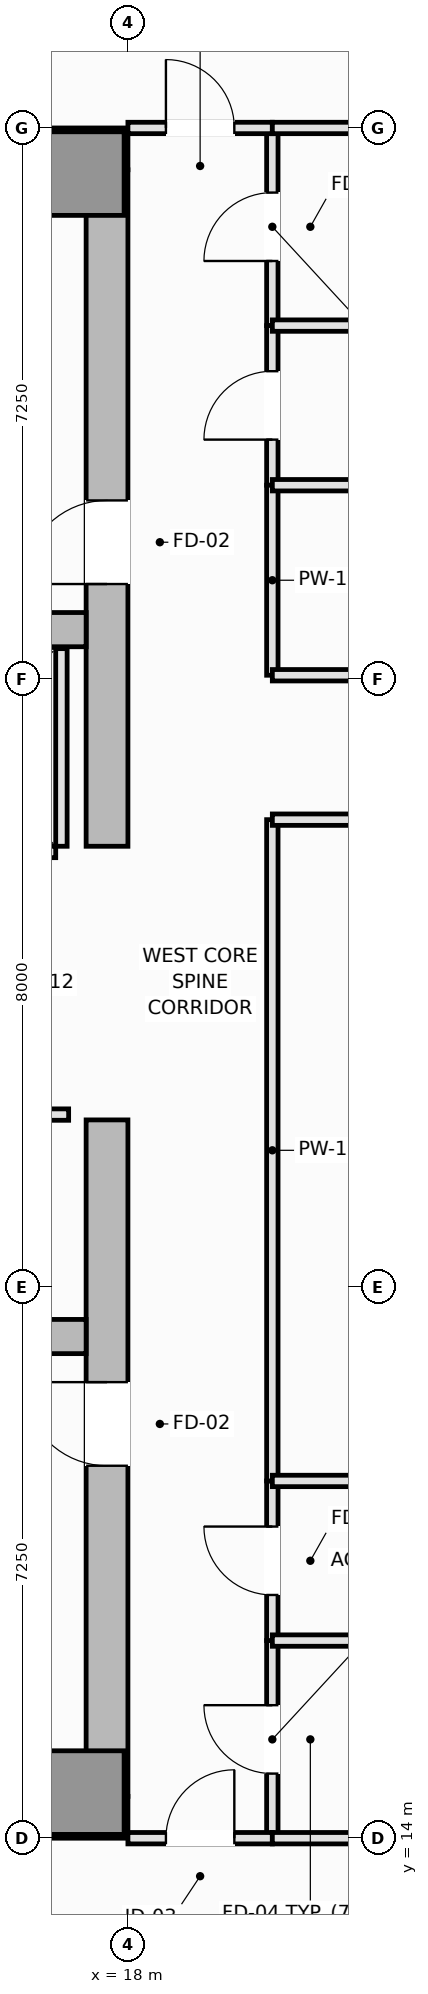
"""IFC4 building model, lengths in metres.
Left out: names, types, materials, properties, quantities, classifications, styles, units other than length and angle.
Written with IfcOpenShell. Run it as: python <this file> out.ifc"""

import sys

from ifc_helpers import new_model, si_unit, direction, frame, frame_2d, origin, origin_2d, place, context, subcontext, project, spatial, rectangle, extrude, element, fill, save


model = new_model("IFC4")
c1 = context("Model", 3, precision=1e-05, world=origin(), true_north=direction((0.0, 1.0)))
c2 = subcontext(c1, "Body", "Model", "MODEL_VIEW")
j1 = project(units=[si_unit("LENGTHUNIT", "METRE"), si_unit("PLANEANGLEUNIT", "RADIAN")], contexts=[c1])
p1 = place(None, origin())
s1 = spatial("IfcSite", under=j1, at=p1, CompositionType="ELEMENT")
p2 = place(p1, origin())
s2 = spatial("IfcBuilding", under=s1, at=p2, CompositionType="ELEMENT")
p3 = place(p2, frame((0.0, 0.0, 209.35)))
s3 = spatial("IfcBuildingStorey", under=s2, at=p3, CompositionType="ELEMENT", Elevation=209.35)
for number, where, z_axis, x_axis in (
    (1, (4.5, 14.275, 0.0), (0.0, 0.0, 1.0), (1.0, 0.0, 0.0)),
    (2, (4.5, 36.225, 0.0), (0.0, 0.0, 1.0), (1.0, 0.0, 0.0)),
):
    element("IfcWall", number, at=place(p3, frame(where, z_axis=z_axis, x_axis=x_axis)), inside=s3, PredefinedType="SHEAR", context=c2, shape_type="SweptSolid", body=[
        extrude(rectangle(XDim=13.5, YDim=0.55, at=frame_2d((6.75, 0.0))), origin(), (0.0, 0.0, 1.0), 3.55),
    ])
p4 = place(p3, frame((17.725, 14.55, 0.0), z_axis=(0.0, 0.0, 1.0), x_axis=(0.0, 1.0, 0.0)))
e3 = element("IfcWall", 3, at=p4, inside=s3, PredefinedType="SHEAR", context=c2, shape_type="SweptSolid", body=[
    extrude(rectangle(XDim=8.9, YDim=0.55, at=frame_2d((4.45, 0.0))), origin(), (0.0, 0.0, 1.0), 3.55),
])
p5 = place(p4, frame((4.35, 0.0, 0.0)))
e4 = element("IfcOpeningElement", 4, at=p5, cuts=e3, PredefinedType="OPENING", context=c2, shape_type="SweptSolid", body=[
    extrude(rectangle(XDim=1.1, YDim=2.15, at=frame_2d((0.55, 1.075))), frame((0.0, 0.285, 0.0), z_axis=(0.0, -1.0, 0.0), x_axis=(1.0, 0.0, 0.0)), (0.0, 0.0, 1.0), 0.57),
])
p6 = place(p3, frame((17.725, 27.05, 0.0), z_axis=(0.0, 0.0, 1.0), x_axis=(0.0, 1.0, 0.0)))
e5 = element("IfcWall", 5, at=p6, inside=s3, PredefinedType="SHEAR", context=c2, shape_type="SweptSolid", body=[
    extrude(rectangle(XDim=8.9, YDim=0.55, at=frame_2d((4.45, 0.0))), origin(), (0.0, 0.0, 1.0), 3.55),
])
p7 = place(p6, frame((3.45, 0.0, 0.0)))
e6 = element("IfcOpeningElement", 6, at=p7, cuts=e5, PredefinedType="OPENING", context=c2, shape_type="SweptSolid", body=[
    extrude(rectangle(XDim=1.1, YDim=2.15, at=frame_2d((0.55, 1.075))), frame((0.0, 0.285, 0.0), z_axis=(0.0, -1.0, 0.0), x_axis=(1.0, 0.0, 0.0)), (0.0, 0.0, 1.0), 0.57),
])
for number, where, z_axis, x_axis in (
    (7, (5.05, 20.6, 0.0), (0.0, 0.0, 1.0), (1.0, 0.0, 0.0)),
    (8, (5.05, 29.9, 0.0), (0.0, 0.0, 1.0), (1.0, 0.0, 0.0)),
):
    element("IfcWall", number, at=place(p3, frame(where, z_axis=z_axis, x_axis=x_axis)), inside=s3, PredefinedType="SHEAR", context=c2, shape_type="SweptSolid", body=[
        extrude(rectangle(XDim=12.4, YDim=0.45, at=frame_2d((6.2, 0.0))), origin(), (0.0, 0.0, 1.0), 3.55),
    ])
for number, where, z_axis, x_axis in (
    (9, (17.4, 14.6, 0.0), (0.0, 0.0, 1.0), (1.0, 0.0, 0.0)),
    (10, (17.4, 35.9, 0.0), (0.0, 0.0, 1.0), (1.0, 0.0, 0.0)),
):
    element("IfcColumn", number, at=place(p3, frame(where, z_axis=z_axis, x_axis=x_axis)), inside=s3, PredefinedType="PILASTER", context=c2, shape_type="SweptSolid", body=[
        extrude(rectangle(XDim=1.1, YDim=1.1, at=origin_2d()), origin(), (0.0, 0.0, 1.0), 3.55),
    ])
p8 = place(p3, frame((14.5, 26.975, 0.0), z_axis=(0.0, 0.0, 1.0), x_axis=(1.0, 0.0, 0.0)))
e11 = element("IfcWall", 11, at=p8, inside=s3, PredefinedType="PARTITIONING", context=c2, shape_type="SweptSolid", body=[
    extrude(rectangle(XDim=2.55, YDim=0.15, at=frame_2d((1.275, 0.0))), origin(), (0.0, 0.0, 1.0), 3.37),
])
p9 = place(p8, frame((0.625, 0.0, 0.0)))
e12 = element("IfcOpeningElement", 12, at=p9, cuts=e11, PredefinedType="OPENING", context=c2, shape_type="SweptSolid", body=[
    extrude(rectangle(XDim=1.3, YDim=2.2, at=frame_2d((0.65, 1.1))), frame((0.0, 0.085, 0.0), z_axis=(0.0, -1.0, 0.0), x_axis=(1.0, 0.0, 0.0)), (0.0, 0.0, 1.0), 0.17),
])
p10 = place(p3, frame((17.125, 27.05, 0.0), z_axis=(0.0, 0.0, 1.0), x_axis=(0.0, 1.0, 0.0)))
e13 = element("IfcWall", 13, at=p10, inside=s3, PredefinedType="PARTITIONING", context=c2, shape_type="SweptSolid", body=[
    extrude(rectangle(XDim=2.6, YDim=0.15, at=frame_2d((1.3, 0.0))), origin(), (0.0, 0.0, 1.0), 3.37),
])
p11 = place(p3, frame((16.05, 23.52, 0.0), z_axis=(0.0, 0.0, 1.0), x_axis=(1.0, 0.0, 0.0)))
e14 = element("IfcWall", 14, at=p11, inside=s3, PredefinedType="PARTITIONING", context=c2, shape_type="SweptSolid", body=[
    extrude(rectangle(XDim=1.17, YDim=0.15, at=frame_2d((0.585, 0.0))), origin(), (0.0, 0.0, 1.0), 3.37),
])
p12 = place(p3, frame((19.9, 14.0, 0.0), z_axis=(0.0, 0.0, 1.0), x_axis=(0.0, 1.0, 0.0)))
e15 = element("IfcWall", 15, at=p12, inside=s3, PredefinedType="PLUMBINGWALL", context=c2, shape_type="SweptSolid", body=[
    extrude(rectangle(XDim=2.6, YDim=0.15, at=frame_2d((1.3, 0.0))), origin(), (0.0, 0.0, 1.0), 3.37),
])
p13 = place(p12, frame((0.85, 0.0, 0.0)))
e16 = element("IfcOpeningElement", 16, at=p13, cuts=e15, PredefinedType="OPENING", context=c2, shape_type="SweptSolid", body=[
    extrude(rectangle(XDim=0.9, YDim=2.1, at=frame_2d((0.45, 1.05))), frame((0.0, 0.085, 0.0), z_axis=(0.0, -1.0, 0.0), x_axis=(1.0, 0.0, 0.0)), (0.0, 0.0, 1.0), 0.17),
])
p14 = place(p3, frame((19.9, 33.9, 0.0), z_axis=(0.0, 0.0, 1.0), x_axis=(0.0, 1.0, 0.0)))
e17 = element("IfcWall", 17, at=p14, inside=s3, PredefinedType="PLUMBINGWALL", context=c2, shape_type="SweptSolid", body=[
    extrude(rectangle(XDim=2.6, YDim=0.15, at=frame_2d((1.3, 0.0))), origin(), (0.0, 0.0, 1.0), 3.37),
])
p15 = place(p14, frame((0.85, 0.0, 0.0)))
e18 = element("IfcOpeningElement", 18, at=p15, cuts=e17, PredefinedType="OPENING", context=c2, shape_type="SweptSolid", body=[
    extrude(rectangle(XDim=0.9, YDim=2.1, at=frame_2d((0.45, 1.05))), frame((0.0, 0.085, 0.0), z_axis=(0.0, -1.0, 0.0), x_axis=(1.0, 0.0, 0.0)), (0.0, 0.0, 1.0), 0.17),
])
p16 = place(p3, frame((19.9, 16.6, 0.0), z_axis=(0.0, 0.0, 1.0), x_axis=(0.0, 1.0, 0.0)))
e19 = element("IfcWall", 19, at=p16, inside=s3, PredefinedType="PLUMBINGWALL", context=c2, shape_type="SweptSolid", body=[
    extrude(rectangle(XDim=2.1, YDim=0.15, at=frame_2d((1.05, 0.0))), origin(), (0.0, 0.0, 1.0), 3.37),
])
p17 = place(p16, frame((0.6, 0.0, 0.0)))
e20 = element("IfcOpeningElement", 20, at=p17, cuts=e19, PredefinedType="OPENING", context=c2, shape_type="SweptSolid", body=[
    extrude(rectangle(XDim=0.9, YDim=2.1, at=frame_2d((0.45, 1.05))), frame((0.0, 0.085, 0.0), z_axis=(0.0, -1.0, 0.0), x_axis=(1.0, 0.0, 0.0)), (0.0, 0.0, 1.0), 0.17),
])
p18 = place(p3, frame((19.9, 31.8, 0.0), z_axis=(0.0, 0.0, 1.0), x_axis=(0.0, 1.0, 0.0)))
e21 = element("IfcWall", 21, at=p18, inside=s3, PredefinedType="PLUMBINGWALL", context=c2, shape_type="SweptSolid", body=[
    extrude(rectangle(XDim=2.1, YDim=0.15, at=frame_2d((1.05, 0.0))), origin(), (0.0, 0.0, 1.0), 3.37),
])
p19 = place(p18, frame((0.6, 0.0, 0.0)))
e22 = element("IfcOpeningElement", 22, at=p19, cuts=e21, PredefinedType="OPENING", context=c2, shape_type="SweptSolid", body=[
    extrude(rectangle(XDim=0.9, YDim=2.1, at=frame_2d((0.45, 1.05))), frame((0.0, 0.085, 0.0), z_axis=(0.0, -1.0, 0.0), x_axis=(1.0, 0.0, 0.0)), (0.0, 0.0, 1.0), 0.17),
])
p20 = place(p3, frame((19.9, 18.7, 0.0), z_axis=(0.0, 0.0, 1.0), x_axis=(0.0, 1.0, 0.0)))
e23 = element("IfcWall", 23, at=p20, inside=s3, PredefinedType="PARTITIONING", context=c2, shape_type="SweptSolid", body=[
    extrude(rectangle(XDim=8.7, YDim=0.15, at=frame_2d((4.35, 0.0))), origin(), (0.0, 0.0, 1.0), 3.37),
])
p21 = place(p3, frame((19.9, 29.3, 0.0), z_axis=(0.0, 0.0, 1.0), x_axis=(0.0, 1.0, 0.0)))
e24 = element("IfcWall", 24, at=p21, inside=s3, PredefinedType="PARTITIONING", context=c2, shape_type="SweptSolid", body=[
    extrude(rectangle(XDim=2.5, YDim=0.15, at=frame_2d((1.25, 0.0))), origin(), (0.0, 0.0, 1.0), 3.37),
])
p22 = place(p3, frame((18.0, 14.0, 0.0), z_axis=(0.0, 0.0, 1.0), x_axis=(1.0, 0.0, 0.0)))
e25 = element("IfcWall", 25, at=p22, inside=s3, PredefinedType="PARTITIONING", context=c2, shape_type="SweptSolid", body=[
    extrude(rectangle(XDim=1.9, YDim=0.15, at=frame_2d((0.95, 0.0))), origin(), (0.0, 0.0, 1.0), 3.37),
])
p23 = place(p22, frame((0.5, 0.0, 0.0)))
e26 = element("IfcOpeningElement", 26, at=p23, cuts=e25, PredefinedType="OPENING", context=c2, shape_type="SweptSolid", body=[
    extrude(rectangle(XDim=0.9, YDim=2.1, at=frame_2d((0.45, 1.05))), frame((0.0, 0.085, 0.0), z_axis=(0.0, -1.0, 0.0), x_axis=(1.0, 0.0, 0.0)), (0.0, 0.0, 1.0), 0.17),
])
p24 = place(p3, frame((18.0, 36.5, 0.0), z_axis=(0.0, 0.0, 1.0), x_axis=(1.0, 0.0, 0.0)))
e27 = element("IfcWall", 27, at=p24, inside=s3, PredefinedType="PARTITIONING", context=c2, shape_type="SweptSolid", body=[
    extrude(rectangle(XDim=1.9, YDim=0.15, at=frame_2d((0.95, 0.0))), origin(), (0.0, 0.0, 1.0), 3.37),
])
p25 = place(p24, frame((0.5, 0.0, 0.0)))
e28 = element("IfcOpeningElement", 28, at=p25, cuts=e27, PredefinedType="OPENING", context=c2, shape_type="SweptSolid", body=[
    extrude(rectangle(XDim=0.9, YDim=2.1, at=frame_2d((0.45, 1.05))), frame((0.0, 0.085, 0.0), z_axis=(0.0, -1.0, 0.0), x_axis=(1.0, 0.0, 0.0)), (0.0, 0.0, 1.0), 0.17),
])
p26 = place(p3, frame((19.9, 27.4, 0.0), z_axis=(0.0, 0.0, 1.0), x_axis=(1.0, 0.0, 0.0)))
e29 = element("IfcWall", 29, at=p26, inside=s3, PredefinedType="PARTITIONING", context=c2, shape_type="SweptSolid", body=[
    extrude(rectangle(XDim=16.4, YDim=0.15, at=frame_2d((8.2, 0.0))), origin(), (0.0, 0.0, 1.0), 3.37),
])
p27 = place(p26, frame((7.7, 0.0, 0.0)))
e30 = element("IfcOpeningElement", 30, at=p27, cuts=e29, PredefinedType="OPENING", context=c2, shape_type="SweptSolid", body=[
    extrude(rectangle(XDim=1.0, YDim=2.15, at=frame_2d((0.5, 1.075))), frame((0.0, 0.085, 0.0), z_axis=(0.0, -1.0, 0.0), x_axis=(1.0, 0.0, 0.0)), (0.0, 0.0, 1.0), 0.17),
])
p28 = place(p3, frame((19.9, 29.3, 0.0), z_axis=(0.0, 0.0, 1.0), x_axis=(1.0, 0.0, 0.0)))
e31 = element("IfcWall", 31, at=p28, inside=s3, PredefinedType="PARTITIONING", context=c2, shape_type="SweptSolid", body=[
    extrude(rectangle(XDim=16.4, YDim=0.15, at=frame_2d((8.2, 0.0))), origin(), (0.0, 0.0, 1.0), 3.37),
])
p29 = place(p28, frame((7.7, 0.0, 0.0)))
e32 = element("IfcOpeningElement", 32, at=p29, cuts=e31, PredefinedType="OPENING", context=c2, shape_type="SweptSolid", body=[
    extrude(rectangle(XDim=1.0, YDim=2.15, at=frame_2d((0.5, 1.075))), frame((0.0, 0.085, 0.0), z_axis=(0.0, -1.0, 0.0), x_axis=(1.0, 0.0, 0.0)), (0.0, 0.0, 1.0), 0.17),
])
for number, where, z_axis, x_axis in (
    (33, (19.9, 16.6, 0.0), (0.0, 0.0, 1.0), (1.0, 0.0, 0.0)),
    (34, (19.9, 14.0, 0.0), (0.0, 0.0, 1.0), (1.0, 0.0, 0.0)),
    (35, (19.9, 33.9, 0.0), (0.0, 0.0, 1.0), (1.0, 0.0, 0.0)),
    (36, (19.9, 36.5, 0.0), (0.0, 0.0, 1.0), (1.0, 0.0, 0.0)),
    (37, (19.9, 18.7, 0.0), (0.0, 0.0, 1.0), (1.0, 0.0, 0.0)),
    (38, (19.9, 31.8, 0.0), (0.0, 0.0, 1.0), (1.0, 0.0, 0.0)),
):
    element("IfcWall", number, at=place(p3, frame(where, z_axis=z_axis, x_axis=x_axis)), inside=s3, PredefinedType="PLUMBINGWALL", context=c2, shape_type="SweptSolid", body=[
        extrude(rectangle(XDim=3.6, YDim=0.15, at=frame_2d((1.8, 0.0))), origin(), (0.0, 0.0, 1.0), 3.37),
    ])
p30 = place(p5, origin())
e39 = element("IfcDoor", 39, at=p30, inside=s3, OperationType="SINGLE_SWING_RIGHT", PredefinedType="DOOR", context=c2, shape_type="SweptSolid", body=[
    extrude(rectangle(XDim=1.1, YDim=2.15, at=frame_2d((0.55, 1.075))), frame((0.0, 0.025, 0.0), z_axis=(0.0, -1.0, 0.0), x_axis=(1.0, 0.0, 0.0)), (0.0, 0.0, 1.0), 0.05),
])
fill(e4, e39)
p31 = place(p7, origin())
e40 = element("IfcDoor", 40, at=p31, inside=s3, OperationType="SINGLE_SWING_LEFT", PredefinedType="DOOR", context=c2, shape_type="SweptSolid", body=[
    extrude(rectangle(XDim=1.1, YDim=2.15, at=frame_2d((0.55, 1.075))), frame((0.0, 0.025, 0.0), z_axis=(0.0, -1.0, 0.0), x_axis=(1.0, 0.0, 0.0)), (0.0, 0.0, 1.0), 0.05),
])
fill(e6, e40)
p32 = place(p13, origin())
e41 = element("IfcDoor", 41, at=p32, inside=s3, OperationType="SINGLE_SWING_RIGHT", PredefinedType="DOOR", context=c2, shape_type="SweptSolid", body=[
    extrude(rectangle(XDim=0.9, YDim=2.1, at=frame_2d((0.45, 1.05))), frame((0.0, 0.025, 0.0), z_axis=(0.0, -1.0, 0.0), x_axis=(1.0, 0.0, 0.0)), (0.0, 0.0, 1.0), 0.05),
])
fill(e16, e41)
p33 = place(p15, origin())
e42 = element("IfcDoor", 42, at=p33, inside=s3, OperationType="SINGLE_SWING_LEFT", PredefinedType="DOOR", context=c2, shape_type="SweptSolid", body=[
    extrude(rectangle(XDim=0.9, YDim=2.1, at=frame_2d((0.45, 1.05))), frame((0.0, 0.025, 0.0), z_axis=(0.0, -1.0, 0.0), x_axis=(1.0, 0.0, 0.0)), (0.0, 0.0, 1.0), 0.05),
])
fill(e18, e42)
p34 = place(p17, origin())
e43 = element("IfcDoor", 43, at=p34, inside=s3, OperationType="SINGLE_SWING_RIGHT", PredefinedType="DOOR", context=c2, shape_type="SweptSolid", body=[
    extrude(rectangle(XDim=0.9, YDim=2.1, at=frame_2d((0.45, 1.05))), frame((0.0, 0.025, 0.0), z_axis=(0.0, -1.0, 0.0), x_axis=(1.0, 0.0, 0.0)), (0.0, 0.0, 1.0), 0.05),
])
fill(e20, e43)
p35 = place(p19, origin())
e44 = element("IfcDoor", 44, at=p35, inside=s3, OperationType="SINGLE_SWING_LEFT", PredefinedType="DOOR", context=c2, shape_type="SweptSolid", body=[
    extrude(rectangle(XDim=0.9, YDim=2.1, at=frame_2d((0.45, 1.05))), frame((0.0, 0.025, 0.0), z_axis=(0.0, -1.0, 0.0), x_axis=(1.0, 0.0, 0.0)), (0.0, 0.0, 1.0), 0.05),
])
fill(e22, e44)
p36 = place(p23, origin())
e45 = element("IfcDoor", 45, at=p36, inside=s3, OperationType="SINGLE_SWING_RIGHT", PredefinedType="DOOR", context=c2, shape_type="SweptSolid", body=[
    extrude(rectangle(XDim=0.9, YDim=2.1, at=frame_2d((0.45, 1.05))), frame((0.0, 0.025, 0.0), z_axis=(0.0, -1.0, 0.0), x_axis=(1.0, 0.0, 0.0)), (0.0, 0.0, 1.0), 0.05),
])
fill(e26, e45)
p37 = place(p25, origin())
e46 = element("IfcDoor", 46, at=p37, inside=s3, OperationType="SINGLE_SWING_LEFT", PredefinedType="DOOR", context=c2, shape_type="SweptSolid", body=[
    extrude(rectangle(XDim=0.9, YDim=2.1, at=frame_2d((0.45, 1.05))), frame((0.0, 0.025, 0.0), z_axis=(0.0, -1.0, 0.0), x_axis=(1.0, 0.0, 0.0)), (0.0, 0.0, 1.0), 0.05),
])
fill(e28, e46)
save(model, sys.argv[1])
